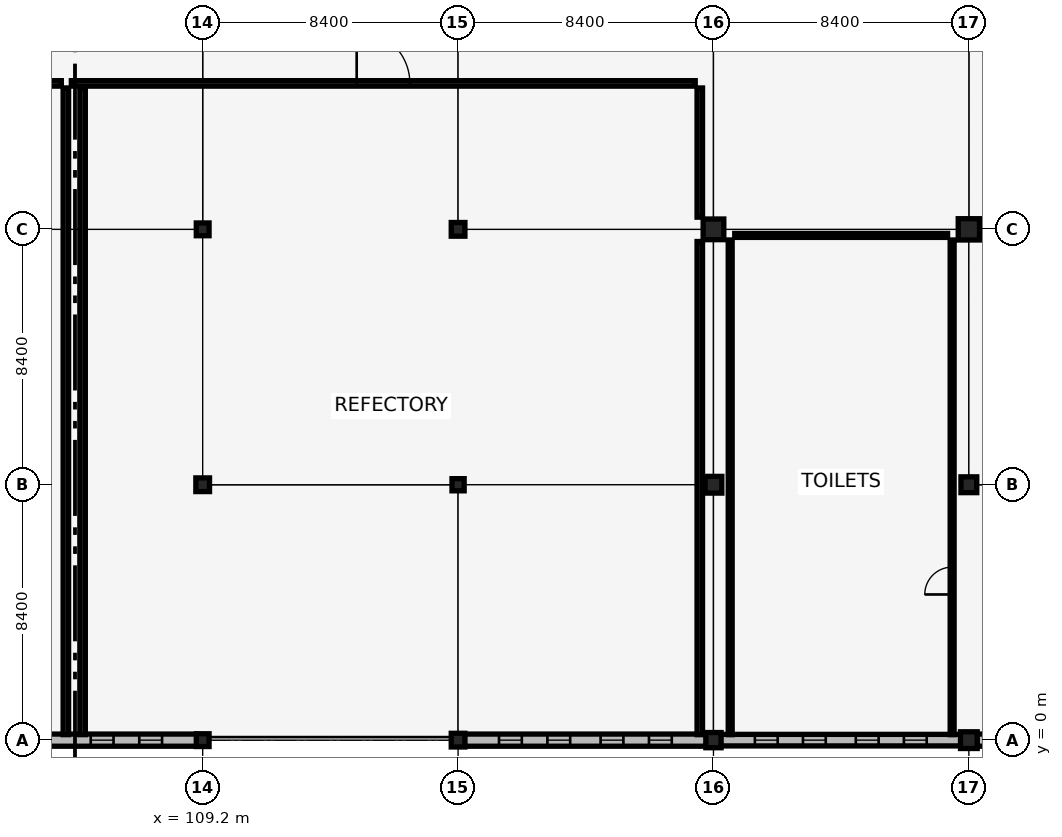
"""IFC4 building model, lengths in metres.
Left out: names, types, materials, properties, quantities, classifications, styles, units other than length and angle.
Written with IfcOpenShell. Run it as: python <this file> out.ifc"""

import sys

from ifc_helpers import new_model, si_unit, direction, frame, frame_2d, origin, origin_2d, place, context, subcontext, project, spatial, rectangle, extrude, element, fill, save


model = new_model("IFC4")
c1 = context("Model", 3, precision=1e-05, world=origin(), true_north=direction((0.0, 1.0)))
c2 = subcontext(c1, "Body", "Model", "MODEL_VIEW")
j1 = project(units=[si_unit("LENGTHUNIT", "METRE"), si_unit("PLANEANGLEUNIT", "RADIAN")], contexts=[c1])
p1 = place(None, origin())
s1 = spatial("IfcSite", under=j1, at=p1, CompositionType="ELEMENT")
p2 = place(p1, origin())
s2 = spatial("IfcBuilding", under=s1, at=p2, CompositionType="ELEMENT")
p3 = place(p2, frame((0.0, 0.0, 9.86)))
s3 = spatial("IfcBuildingStorey", under=s2, at=p3, CompositionType="ELEMENT", Elevation=9.86)
p4 = place(p3, frame((109.2, 0.0, 0.0), z_axis=(0.0, 0.0, 1.0), x_axis=(1.0, 0.0, 0.0)))
e1 = element("IfcColumn", 1, at=p4, inside=s3, PredefinedType="COLUMN", context=c2, shape_type="SweptSolid", body=[
    extrude(rectangle(XDim=0.42, YDim=0.42, at=origin_2d()), origin(), (0.0, 0.0, 1.0), 3.78),
])
p5 = place(p3, frame((109.2, 8.4, 0.0), z_axis=(0.0, 0.0, 1.0), x_axis=(1.0, 0.0, 0.0)))
e2 = element("IfcColumn", 2, at=p5, inside=s3, PredefinedType="COLUMN", context=c2, shape_type="SweptSolid", body=[
    extrude(rectangle(XDim=0.45, YDim=0.45, at=origin_2d()), origin(), (0.0, 0.0, 1.0), 3.78),
])
p6 = place(p3, frame((109.2, 16.8, 0.0), z_axis=(0.0, 0.0, 1.0), x_axis=(1.0, 0.0, 0.0)))
e3 = element("IfcColumn", 3, at=p6, inside=s3, PredefinedType="COLUMN", context=c2, shape_type="SweptSolid", body=[
    extrude(rectangle(XDim=0.42, YDim=0.42, at=origin_2d()), origin(), (0.0, 0.0, 1.0), 3.78),
])
p7 = place(p3, frame((117.6, 0.0, 0.0), z_axis=(0.0, 0.0, 1.0), x_axis=(1.0, 0.0, 0.0)))
e4 = element("IfcColumn", 4, at=p7, inside=s3, PredefinedType="COLUMN", context=c2, shape_type="SweptSolid", body=[
    extrude(rectangle(XDim=0.45, YDim=0.45, at=origin_2d()), origin(), (0.0, 0.0, 1.0), 3.78),
])
p8 = place(p3, frame((117.6, 8.4, 0.0), z_axis=(0.0, 0.0, 1.0), x_axis=(1.0, 0.0, 0.0)))
e5 = element("IfcColumn", 5, at=p8, inside=s3, PredefinedType="COLUMN", context=c2, shape_type="SweptSolid", body=[
    extrude(rectangle(XDim=0.4, YDim=0.4, at=origin_2d()), origin(), (0.0, 0.0, 1.0), 3.78),
])
p9 = place(p3, frame((117.6, 16.8, 0.0), z_axis=(0.0, 0.0, 1.0), x_axis=(1.0, 0.0, 0.0)))
e6 = element("IfcColumn", 6, at=p9, inside=s3, PredefinedType="COLUMN", context=c2, shape_type="SweptSolid", body=[
    extrude(rectangle(XDim=0.45, YDim=0.45, at=origin_2d()), origin(), (0.0, 0.0, 1.0), 3.78),
])
p10 = place(p3, frame((126.0, 0.0, 0.0), z_axis=(0.0, 0.0, 1.0), x_axis=(1.0, 0.0, 0.0)))
e7 = element("IfcColumn", 7, at=p10, inside=s3, PredefinedType="COLUMN", context=c2, shape_type="SweptSolid", body=[
    extrude(rectangle(XDim=0.5, YDim=0.5, at=origin_2d()), origin(), (0.0, 0.0, 1.0), 3.78),
])
p11 = place(p3, frame((126.0, 8.4, 0.0), z_axis=(0.0, 0.0, 1.0), x_axis=(1.0, 0.0, 0.0)))
e8 = element("IfcColumn", 8, at=p11, inside=s3, PredefinedType="COLUMN", context=c2, shape_type="SweptSolid", body=[
    extrude(rectangle(XDim=0.55, YDim=0.55, at=origin_2d()), origin(), (0.0, 0.0, 1.0), 3.78),
])
p12 = place(p3, frame((126.0, 16.8, 0.0), z_axis=(0.0, 0.0, 1.0), x_axis=(1.0, 0.0, 0.0)))
e9 = element("IfcColumn", 9, at=p12, inside=s3, PredefinedType="COLUMN", context=c2, shape_type="SweptSolid", body=[
    extrude(rectangle(XDim=0.68, YDim=0.68, at=origin_2d()), origin(), (0.0, 0.0, 1.0), 3.78),
])
p13 = place(p3, frame((134.4, 0.0, 0.0), z_axis=(0.0, 0.0, 1.0), x_axis=(1.0, 0.0, 0.0)))
e10 = element("IfcColumn", 10, at=p13, inside=s3, PredefinedType="COLUMN", context=c2, shape_type="SweptSolid", body=[
    extrude(rectangle(XDim=0.55, YDim=0.55, at=origin_2d()), origin(), (0.0, 0.0, 1.0), 3.78),
])
p14 = place(p3, frame((134.4, 8.4, 0.0), z_axis=(0.0, 0.0, 1.0), x_axis=(1.0, 0.0, 0.0)))
e11 = element("IfcColumn", 11, at=p14, inside=s3, PredefinedType="COLUMN", context=c2, shape_type="SweptSolid", body=[
    extrude(rectangle(XDim=0.52, YDim=0.52, at=origin_2d()), origin(), (0.0, 0.0, 1.0), 3.78),
])
p15 = place(p3, frame((134.4, 16.8, 0.0), z_axis=(0.0, 0.0, 1.0), x_axis=(1.0, 0.0, 0.0)))
e12 = element("IfcColumn", 12, at=p15, inside=s3, PredefinedType="COLUMN", context=c2, shape_type="SweptSolid", body=[
    extrude(rectangle(XDim=0.7, YDim=0.7, at=origin_2d()), origin(), (0.0, 0.0, 1.0), 3.78),
])
p16 = place(p3, frame((101.025, 0.0, 0.0), z_axis=(0.0, 0.0, 1.0), x_axis=(1.0, 0.0, 0.0)))
e13 = element("IfcWall", 13, at=p16, inside=s3, PredefinedType="SOLIDWALL", context=c2, shape_type="SweptSolid", body=[
    extrude(rectangle(XDim=7.98, YDim=0.4, at=frame_2d((3.99, 0.0))), origin(), (0.0, 0.0, 1.0), 3.02),
])
p17 = place(p16, frame((1.141, 0.0, 0.7)))
e14 = element("IfcOpeningElement", 14, at=p17, cuts=e13, PredefinedType="OPENING", context=c2, shape_type="SweptSolid", body=[
    extrude(rectangle(XDim=0.75, YDim=2.1, at=frame_2d((0.375, 1.05))), frame((0.0, 0.21, 0.0), z_axis=(0.0, -1.0, 0.0), x_axis=(1.0, 0.0, 0.0)), (0.0, 0.0, 1.0), 0.42),
])
p18 = place(p16, frame((4.493, 0.0, 0.7)))
e15 = element("IfcOpeningElement", 15, at=p18, cuts=e13, PredefinedType="OPENING", context=c2, shape_type="SweptSolid", body=[
    extrude(rectangle(XDim=0.75, YDim=2.1, at=frame_2d((0.375, 1.05))), frame((0.0, 0.21, 0.0), z_axis=(0.0, -1.0, 0.0), x_axis=(1.0, 0.0, 0.0)), (0.0, 0.0, 1.0), 0.42),
])
p19 = place(p16, frame((6.089, 0.0, 0.7)))
e16 = element("IfcOpeningElement", 16, at=p19, cuts=e13, PredefinedType="OPENING", context=c2, shape_type="SweptSolid", body=[
    extrude(rectangle(XDim=0.75, YDim=2.1, at=frame_2d((0.375, 1.05))), frame((0.0, 0.21, 0.0), z_axis=(0.0, -1.0, 0.0), x_axis=(1.0, 0.0, 0.0)), (0.0, 0.0, 1.0), 0.42),
])
p20 = place(p3, frame((117.81, 0.0, 0.0), z_axis=(0.0, 0.0, 1.0), x_axis=(1.0, 0.0, 0.0)))
e17 = element("IfcWall", 17, at=p20, inside=s3, PredefinedType="SOLIDWALL", context=c2, shape_type="SweptSolid", body=[
    extrude(rectangle(XDim=7.955, YDim=0.4, at=frame_2d((3.978, 0.0))), origin(), (0.0, 0.0, 1.0), 3.02),
])
p21 = place(p20, frame((1.136, 0.0, 0.7)))
e18 = element("IfcOpeningElement", 18, at=p21, cuts=e17, PredefinedType="OPENING", context=c2, shape_type="SweptSolid", body=[
    extrude(rectangle(XDim=0.75, YDim=2.1, at=frame_2d((0.375, 1.05))), frame((0.0, 0.21, 0.0), z_axis=(0.0, -1.0, 0.0), x_axis=(1.0, 0.0, 0.0)), (0.0, 0.0, 1.0), 0.42),
])
p22 = place(p20, frame((2.728, 0.0, 0.7)))
e19 = element("IfcOpeningElement", 19, at=p22, cuts=e17, PredefinedType="OPENING", context=c2, shape_type="SweptSolid", body=[
    extrude(rectangle(XDim=0.75, YDim=2.1, at=frame_2d((0.375, 1.05))), frame((0.0, 0.21, 0.0), z_axis=(0.0, -1.0, 0.0), x_axis=(1.0, 0.0, 0.0)), (0.0, 0.0, 1.0), 0.42),
])
p23 = place(p20, frame((4.478, 0.0, 0.7)))
e20 = element("IfcOpeningElement", 20, at=p23, cuts=e17, PredefinedType="OPENING", context=c2, shape_type="SweptSolid", body=[
    extrude(rectangle(XDim=0.75, YDim=2.1, at=frame_2d((0.375, 1.05))), frame((0.0, 0.21, 0.0), z_axis=(0.0, -1.0, 0.0), x_axis=(1.0, 0.0, 0.0)), (0.0, 0.0, 1.0), 0.42),
])
p24 = place(p20, frame((6.069, 0.0, 0.7)))
e21 = element("IfcOpeningElement", 21, at=p24, cuts=e17, PredefinedType="OPENING", context=c2, shape_type="SweptSolid", body=[
    extrude(rectangle(XDim=0.75, YDim=2.1, at=frame_2d((0.375, 1.05))), frame((0.0, 0.21, 0.0), z_axis=(0.0, -1.0, 0.0), x_axis=(1.0, 0.0, 0.0)), (0.0, 0.0, 1.0), 0.42),
])
p25 = place(p3, frame((126.235, 0.0, 0.0), z_axis=(0.0, 0.0, 1.0), x_axis=(1.0, 0.0, 0.0)))
e22 = element("IfcWall", 22, at=p25, inside=s3, PredefinedType="SOLIDWALL", context=c2, shape_type="SweptSolid", body=[
    extrude(rectangle(XDim=7.905, YDim=0.38, at=frame_2d((3.952, 0.0))), origin(), (0.0, 0.0, 1.0), 3.01),
])
p26 = place(p25, frame((1.127, 0.0, 0.7)))
e23 = element("IfcOpeningElement", 23, at=p26, cuts=e22, PredefinedType="OPENING", context=c2, shape_type="SweptSolid", body=[
    extrude(rectangle(XDim=0.75, YDim=2.1, at=frame_2d((0.375, 1.05))), frame((0.0, 0.2, 0.0), z_axis=(0.0, -1.0, 0.0), x_axis=(1.0, 0.0, 0.0)), (0.0, 0.0, 1.0), 0.4),
])
p27 = place(p25, frame((2.708, 0.0, 0.7)))
e24 = element("IfcOpeningElement", 24, at=p27, cuts=e22, PredefinedType="OPENING", context=c2, shape_type="SweptSolid", body=[
    extrude(rectangle(XDim=0.75, YDim=2.1, at=frame_2d((0.375, 1.05))), frame((0.0, 0.2, 0.0), z_axis=(0.0, -1.0, 0.0), x_axis=(1.0, 0.0, 0.0)), (0.0, 0.0, 1.0), 0.4),
])
p28 = place(p25, frame((4.447, 0.0, 0.7)))
e25 = element("IfcOpeningElement", 25, at=p28, cuts=e22, PredefinedType="OPENING", context=c2, shape_type="SweptSolid", body=[
    extrude(rectangle(XDim=0.75, YDim=2.1, at=frame_2d((0.375, 1.05))), frame((0.0, 0.2, 0.0), z_axis=(0.0, -1.0, 0.0), x_axis=(1.0, 0.0, 0.0)), (0.0, 0.0, 1.0), 0.4),
])
p29 = place(p25, frame((6.028, 0.0, 0.7)))
e26 = element("IfcOpeningElement", 26, at=p29, cuts=e22, PredefinedType="OPENING", context=c2, shape_type="SweptSolid", body=[
    extrude(rectangle(XDim=0.75, YDim=2.1, at=frame_2d((0.375, 1.05))), frame((0.0, 0.2, 0.0), z_axis=(0.0, -1.0, 0.0), x_axis=(1.0, 0.0, 0.0)), (0.0, 0.0, 1.0), 0.4),
])
p30 = place(p3, frame((134.66, 0.0, 0.0), z_axis=(0.0, 0.0, 1.0), x_axis=(1.0, 0.0, 0.0)))
e27 = element("IfcWall", 27, at=p30, inside=s3, PredefinedType="SOLIDWALL", context=c2, shape_type="SweptSolid", body=[
    extrude(rectangle(XDim=7.905, YDim=0.4, at=frame_2d((3.953, 0.0))), origin(), (0.0, 0.0, 1.0), 3.01),
])
p31 = place(p30, frame((1.127, 0.0, 0.7)))
e28 = element("IfcOpeningElement", 28, at=p31, cuts=e27, PredefinedType="OPENING", context=c2, shape_type="SweptSolid", body=[
    extrude(rectangle(XDim=0.75, YDim=2.1, at=frame_2d((0.375, 1.05))), frame((0.0, 0.21, 0.0), z_axis=(0.0, -1.0, 0.0), x_axis=(1.0, 0.0, 0.0)), (0.0, 0.0, 1.0), 0.42),
])
p32 = place(p30, frame((4.447, 0.0, 0.7)))
e29 = element("IfcOpeningElement", 29, at=p32, cuts=e27, PredefinedType="OPENING", context=c2, shape_type="SweptSolid", body=[
    extrude(rectangle(XDim=0.75, YDim=2.1, at=frame_2d((0.375, 1.05))), frame((0.0, 0.21, 0.0), z_axis=(0.0, -1.0, 0.0), x_axis=(1.0, 0.0, 0.0)), (0.0, 0.0, 1.0), 0.42),
])
p33 = place(p30, frame((6.028, 0.0, 0.7)))
e30 = element("IfcOpeningElement", 30, at=p33, cuts=e27, PredefinedType="OPENING", context=c2, shape_type="SweptSolid", body=[
    extrude(rectangle(XDim=0.75, YDim=2.1, at=frame_2d((0.375, 1.05))), frame((0.0, 0.21, 0.0), z_axis=(0.0, -1.0, 0.0), x_axis=(1.0, 0.0, 0.0)), (0.0, 0.0, 1.0), 0.42),
])
p34 = place(p3, frame((87.1, 21.6, 0.0), z_axis=(0.0, 0.0, 1.0), x_axis=(1.0, 0.0, 0.0)))
e31 = element("IfcWall", 31, at=p34, inside=s3, PredefinedType="PARTITIONING", context=c2, shape_type="SweptSolid", body=[
    extrude(rectangle(XDim=17.45, YDim=0.18, at=frame_2d((8.725, 0.0))), origin(), (0.0, 0.0, 1.0), 2.96),
])
p35 = place(p34, frame((8.15, 0.0, 0.0)))
e32 = element("IfcOpeningElement", 32, at=p35, cuts=e31, PredefinedType="OPENING", context=c2, shape_type="SweptSolid", body=[
    extrude(rectangle(XDim=1.15, YDim=2.15, at=frame_2d((0.575, 1.075))), frame((0.0, 0.1, 0.0), z_axis=(0.0, -1.0, 0.0), x_axis=(1.0, 0.0, 0.0)), (0.0, 0.0, 1.0), 0.2),
])
p36 = place(p3, frame((104.7, 0.18, 0.0), z_axis=(0.0, 0.0, 1.0), x_axis=(0.0, 1.0, 0.0)))
e33 = element("IfcWall", 33, at=p36, inside=s3, PredefinedType="PARTITIONING", context=c2, shape_type="SweptSolid", body=[
    extrude(rectangle(XDim=21.27, YDim=0.18, at=frame_2d((10.635, 0.0))), origin(), (0.0, 0.0, 1.0), 2.92),
])
p37 = place(p3, frame((104.88, 21.6, 0.0), z_axis=(0.0, 0.0, 1.0), x_axis=(1.0, 0.0, 0.0)))
e34 = element("IfcWall", 34, at=p37, inside=s3, PredefinedType="PARTITIONING", context=c2, shape_type="SweptSolid", body=[
    extrude(rectangle(XDim=20.52, YDim=0.18, at=frame_2d((10.26, 0.0))), origin(), (0.0, 0.0, 1.0), 2.96),
])
p38 = place(p37, frame((9.385, 0.0, 0.0)))
e35 = element("IfcOpeningElement", 35, at=p38, cuts=e34, PredefinedType="OPENING", context=c2, shape_type="SweptSolid", body=[
    extrude(rectangle(XDim=1.75, YDim=2.3, at=frame_2d((0.875, 1.15))), frame((0.0, 0.1, 0.0), z_axis=(0.0, -1.0, 0.0), x_axis=(1.0, 0.0, 0.0)), (0.0, 0.0, 1.0), 0.2),
])
p39 = place(p3, frame((105.25, 0.18, 0.0), z_axis=(0.0, 0.0, 1.0), x_axis=(0.0, 1.0, 0.0)))
e36 = element("IfcWall", 36, at=p39, inside=s3, PredefinedType="PARTITIONING", context=c2, shape_type="SweptSolid", body=[
    extrude(rectangle(XDim=21.27, YDim=0.18, at=frame_2d((10.635, 0.0))), origin(), (0.0, 0.0, 1.0), 2.92),
])
p40 = place(p3, frame((125.55, 0.18, 0.0), z_axis=(0.0, 0.0, 1.0), x_axis=(0.0, 1.0, 0.0)))
e37 = element("IfcWall", 37, at=p40, inside=s3, PredefinedType="PARTITIONING", context=c2, shape_type="SweptSolid", body=[
    extrude(rectangle(XDim=16.22, YDim=0.18, at=frame_2d((8.11, 0.0))), origin(), (0.0, 0.0, 1.0), 2.96),
])
p41 = place(p3, frame((125.55, 17.2, 0.0), z_axis=(0.0, 0.0, 1.0), x_axis=(0.0, 1.0, 0.0)))
e38 = element("IfcWall", 38, at=p41, inside=s3, PredefinedType="PARTITIONING", context=c2, shape_type="SweptSolid", body=[
    extrude(rectangle(XDim=4.25, YDim=0.18, at=frame_2d((2.125, 0.0))), origin(), (0.0, 0.0, 1.0), 3.21),
])
p42 = place(p3, frame((133.85, 0.18, 0.0), z_axis=(0.0, 0.0, 1.0), x_axis=(0.0, 1.0, 0.0)))
e39 = element("IfcWall", 39, at=p42, inside=s3, PredefinedType="PARTITIONING", context=c2, shape_type="SweptSolid", body=[
    extrude(rectangle(XDim=16.27, YDim=0.13, at=frame_2d((8.135, 0.0))), origin(), (0.0, 0.0, 1.0), 2.91),
])
p43 = place(p42, frame((4.611, 0.0, 0.0)))
e40 = element("IfcOpeningElement", 40, at=p43, cuts=e39, PredefinedType="OPENING", context=c2, shape_type="SweptSolid", body=[
    extrude(rectangle(XDim=0.9, YDim=2.1, at=frame_2d((0.45, 1.05))), frame((0.0, 0.075, 0.0), z_axis=(0.0, -1.0, 0.0), x_axis=(1.0, 0.0, 0.0)), (0.0, 0.0, 1.0), 0.15),
])
p44 = place(p3, frame((126.7, 16.6, 0.0), z_axis=(0.0, 0.0, 1.0), x_axis=(1.0, 0.0, 0.0)))
e41 = element("IfcWall", 41, at=p44, inside=s3, PredefinedType="PARTITIONING", context=c2, shape_type="SweptSolid", body=[
    extrude(rectangle(XDim=7.0, YDim=0.13, at=frame_2d((3.5, 0.0))), origin(), (0.0, 0.0, 1.0), 2.91),
])
p45 = place(p3, frame((126.55, 0.18, 0.0), z_axis=(0.0, 0.0, 1.0), x_axis=(0.0, 1.0, 0.0)))
e42 = element("IfcWall", 42, at=p45, inside=s3, PredefinedType="PARTITIONING", context=c2, shape_type="SweptSolid", body=[
    extrude(rectangle(XDim=16.27, YDim=0.13, at=frame_2d((8.135, 0.0))), origin(), (0.0, 0.0, 1.0), 2.91),
])
p46 = place(p18, origin())
e43 = element("IfcWindow", 43, at=p46, inside=s3, PartitioningType="DOUBLE_PANEL_VERTICAL", PredefinedType="WINDOW", context=c2, shape_type="SweptSolid", body=[
    extrude(rectangle(XDim=0.75, YDim=2.1, at=frame_2d((0.375, 1.05))), frame((0.0, 0.03, 0.0), z_axis=(0.0, -1.0, 0.0), x_axis=(1.0, 0.0, 0.0)), (0.0, 0.0, 1.0), 0.06),
])
fill(e15, e43)
p47 = place(p19, origin())
e44 = element("IfcWindow", 44, at=p47, inside=s3, PartitioningType="DOUBLE_PANEL_VERTICAL", PredefinedType="WINDOW", context=c2, shape_type="SweptSolid", body=[
    extrude(rectangle(XDim=0.75, YDim=2.1, at=frame_2d((0.375, 1.05))), frame((0.0, 0.03, 0.0), z_axis=(0.0, -1.0, 0.0), x_axis=(1.0, 0.0, 0.0)), (0.0, 0.0, 1.0), 0.06),
])
fill(e16, e44)
p48 = place(p21, origin())
e45 = element("IfcWindow", 45, at=p48, inside=s3, PartitioningType="DOUBLE_PANEL_VERTICAL", PredefinedType="WINDOW", context=c2, shape_type="SweptSolid", body=[
    extrude(rectangle(XDim=0.75, YDim=2.1, at=frame_2d((0.375, 1.05))), frame((0.0, 0.03, 0.0), z_axis=(0.0, -1.0, 0.0), x_axis=(1.0, 0.0, 0.0)), (0.0, 0.0, 1.0), 0.06),
])
fill(e18, e45)
p49 = place(p22, origin())
e46 = element("IfcWindow", 46, at=p49, inside=s3, PartitioningType="DOUBLE_PANEL_VERTICAL", PredefinedType="WINDOW", context=c2, shape_type="SweptSolid", body=[
    extrude(rectangle(XDim=0.75, YDim=2.1, at=frame_2d((0.375, 1.05))), frame((0.0, 0.03, 0.0), z_axis=(0.0, -1.0, 0.0), x_axis=(1.0, 0.0, 0.0)), (0.0, 0.0, 1.0), 0.06),
])
fill(e19, e46)
p50 = place(p23, origin())
e47 = element("IfcWindow", 47, at=p50, inside=s3, PartitioningType="DOUBLE_PANEL_VERTICAL", PredefinedType="WINDOW", context=c2, shape_type="SweptSolid", body=[
    extrude(rectangle(XDim=0.75, YDim=2.1, at=frame_2d((0.375, 1.05))), frame((0.0, 0.03, 0.0), z_axis=(0.0, -1.0, 0.0), x_axis=(1.0, 0.0, 0.0)), (0.0, 0.0, 1.0), 0.06),
])
fill(e20, e47)
p51 = place(p24, origin())
e48 = element("IfcWindow", 48, at=p51, inside=s3, PartitioningType="DOUBLE_PANEL_VERTICAL", PredefinedType="WINDOW", context=c2, shape_type="SweptSolid", body=[
    extrude(rectangle(XDim=0.75, YDim=2.1, at=frame_2d((0.375, 1.05))), frame((0.0, 0.03, 0.0), z_axis=(0.0, -1.0, 0.0), x_axis=(1.0, 0.0, 0.0)), (0.0, 0.0, 1.0), 0.06),
])
fill(e21, e48)
p52 = place(p26, origin())
e49 = element("IfcWindow", 49, at=p52, inside=s3, PartitioningType="DOUBLE_PANEL_VERTICAL", PredefinedType="WINDOW", context=c2, shape_type="SweptSolid", body=[
    extrude(rectangle(XDim=0.75, YDim=2.1, at=frame_2d((0.375, 1.05))), frame((0.0, 0.03, 0.0), z_axis=(0.0, -1.0, 0.0), x_axis=(1.0, 0.0, 0.0)), (0.0, 0.0, 1.0), 0.06),
])
fill(e23, e49)
p53 = place(p27, origin())
e50 = element("IfcWindow", 50, at=p53, inside=s3, PartitioningType="DOUBLE_PANEL_VERTICAL", PredefinedType="WINDOW", context=c2, shape_type="SweptSolid", body=[
    extrude(rectangle(XDim=0.75, YDim=2.1, at=frame_2d((0.375, 1.05))), frame((0.0, 0.03, 0.0), z_axis=(0.0, -1.0, 0.0), x_axis=(1.0, 0.0, 0.0)), (0.0, 0.0, 1.0), 0.06),
])
fill(e24, e50)
p54 = place(p28, origin())
e51 = element("IfcWindow", 51, at=p54, inside=s3, PartitioningType="DOUBLE_PANEL_VERTICAL", PredefinedType="WINDOW", context=c2, shape_type="SweptSolid", body=[
    extrude(rectangle(XDim=0.75, YDim=2.1, at=frame_2d((0.375, 1.05))), frame((0.0, 0.03, 0.0), z_axis=(0.0, -1.0, 0.0), x_axis=(1.0, 0.0, 0.0)), (0.0, 0.0, 1.0), 0.06),
])
fill(e25, e51)
p55 = place(p29, origin())
e52 = element("IfcWindow", 52, at=p55, inside=s3, PartitioningType="DOUBLE_PANEL_VERTICAL", PredefinedType="WINDOW", context=c2, shape_type="SweptSolid", body=[
    extrude(rectangle(XDim=0.75, YDim=2.1, at=frame_2d((0.375, 1.05))), frame((0.0, 0.03, 0.0), z_axis=(0.0, -1.0, 0.0), x_axis=(1.0, 0.0, 0.0)), (0.0, 0.0, 1.0), 0.06),
])
fill(e26, e52)
p56 = place(p38, origin())
e53 = element("IfcDoor", 53, at=p56, inside=s3, OperationType="DOUBLE_DOOR_SINGLE_SWING", PredefinedType="DOOR", context=c2, shape_type="SweptSolid", body=[
    extrude(rectangle(XDim=1.75, YDim=2.3, at=frame_2d((0.875, 1.15))), frame((0.0, 0.025, 0.0), z_axis=(0.0, -1.0, 0.0), x_axis=(1.0, 0.0, 0.0)), (0.0, 0.0, 1.0), 0.05),
])
fill(e35, e53)
p57 = place(p43, origin())
e54 = element("IfcDoor", 54, at=p57, inside=s3, OperationType="SINGLE_SWING_LEFT", PredefinedType="DOOR", context=c2, shape_type="SweptSolid", body=[
    extrude(rectangle(XDim=0.9, YDim=2.1, at=frame_2d((0.45, 1.05))), frame((0.0, 0.025, 0.0), z_axis=(0.0, -1.0, 0.0), x_axis=(1.0, 0.0, 0.0)), (0.0, 0.0, 1.0), 0.05),
])
fill(e40, e54)
save(model, sys.argv[1])
